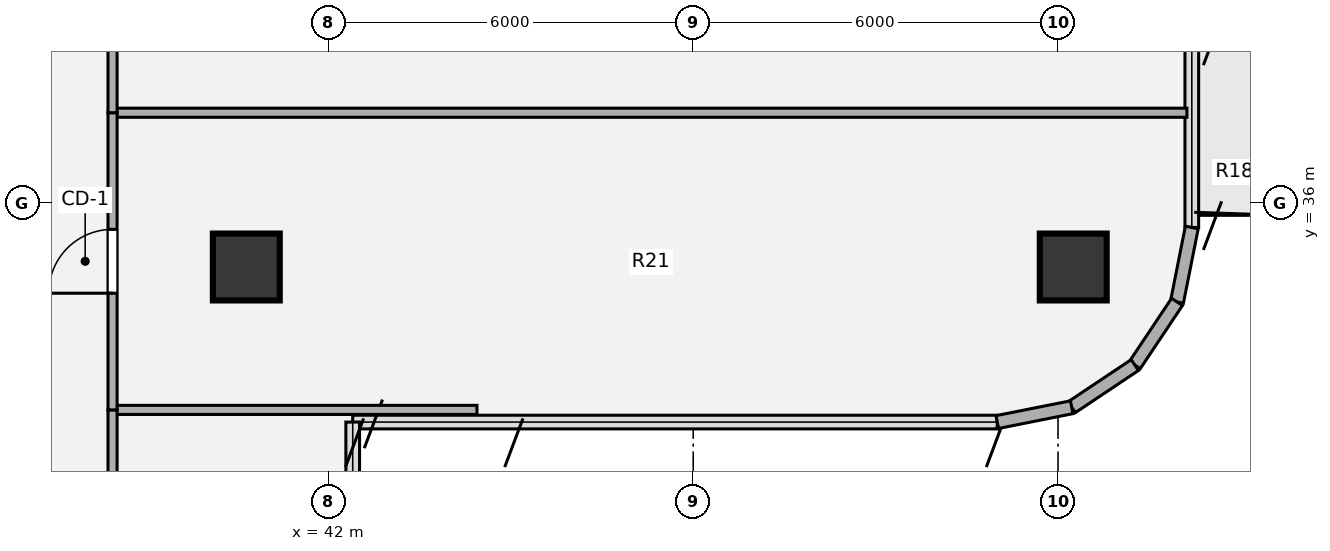
"""IFC4 building model, lengths in metres.
Left out: names, types, materials, properties, quantities, classifications, styles, units other than length and angle.
Written with IfcOpenShell. Run it as: python <this file> out.ifc"""

import sys

from ifc_helpers import new_model, si_unit, direction, frame, frame_2d, origin, origin_2d, place, context, subcontext, project, spatial, rectangle, hollow_circle, extrude, source, transform, mapped, element, fill, save


model = new_model("IFC4")
c1 = context("Model", 3, precision=1e-05, world=origin(), true_north=direction((0.0, 1.0)))
c2 = subcontext(c1, "Body", "Model", "MODEL_VIEW")
j1 = project(units=[si_unit("LENGTHUNIT", "METRE"), si_unit("PLANEANGLEUNIT", "RADIAN")], contexts=[c1])
p1 = place(None, origin())
s1 = spatial("IfcSite", under=j1, at=p1, CompositionType="ELEMENT")
p2 = place(p1, origin())
s2 = spatial("IfcBuilding", under=s1, at=p2, CompositionType="ELEMENT")
p3 = place(p2, frame((0.0, 0.0, 198.0)))
s3 = spatial("IfcBuildingStorey", under=s2, at=p3, CompositionType="ELEMENT", Elevation=198.0)
m1 = source(origin(), c2, "Body", "SweptSolid", [
    extrude(hollow_circle(Radius=0.55, WallThickness=0.04, at=origin_2d()), origin(), (0.0, 0.0, 1.0), 3.78),
])
for number, where, z_axis, x_axis in (
    (1, (54.25, 34.95, 0.0), (0.0, 0.0, 1.0), (1.0, 0.0, 0.0)),
    (2, (40.65, 34.95, 0.0), (0.0, 0.0, 1.0), (1.0, 0.0, 0.0)),
):
    element("IfcColumn", number, at=place(p3, frame(where, z_axis=z_axis, x_axis=x_axis)), inside=s3, PredefinedType="COLUMN", context=c2, shape_type="MappedRepresentation", body=[
        mapped(m1, transform((0.0, 0.0, 0.0), x_axis=(1.0, 0.0, 0.0), y_axis=(0.0, 1.0, 0.0), z_axis=(0.0, 0.0, 1.0), scale=1.0)),
    ])
for number, where, z_axis, x_axis in (
    (3, (56.2, 35.6, 0.0), (0.0, 0.0, 1.0), (-0.195, -0.981, 0.0)),
    (4, (55.956, 34.375, 0.0), (0.0, 0.0, 1.0), (-0.556, -0.831, 0.0)),
    (5, (55.263, 33.337, 0.0), (0.0, 0.0, 1.0), (-0.831, -0.556, 0.0)),
    (6, (54.225, 32.644, 0.0), (0.0, 0.0, 1.0), (-0.981, -0.195, 0.0)),
):
    element("IfcWall", number, at=place(p3, frame(where, z_axis=z_axis, x_axis=x_axis)), inside=s3, PredefinedType="SOLIDWALL", context=c2, shape_type="SweptSolid", body=[
        extrude(rectangle(XDim=1.249, YDim=0.215, at=frame_2d((0.624, 0.0))), origin(), (0.0, 0.0, 1.0), 3.53),
    ])
p4 = place(p3, frame((38.45, 32.6, 0.0), z_axis=(0.0, 0.0, 1.0), x_axis=(1.0, 0.0, 0.0)))
e7 = element("IfcWall", 7, at=p4, inside=s3, PredefinedType="PARTITIONING", context=c2, shape_type="SweptSolid", body=[
    extrude(rectangle(XDim=5.993, YDim=0.15, at=frame_2d((2.997, 0.0))), origin(), (0.0, 0.0, 1.0), 3.5),
])
p5 = place(p3, frame((38.45, 37.487, 0.0), z_axis=(0.0, 0.0, 1.0), x_axis=(1.0, 0.0, 0.0)))
e8 = element("IfcWall", 8, at=p5, inside=s3, PredefinedType="PARTITIONING", context=c2, shape_type="SweptSolid", body=[
    extrude(rectangle(XDim=17.67, YDim=0.15, at=frame_2d((8.835, 0.0))), origin(), (0.0, 0.0, 1.0), 3.055),
])
p6 = place(p3, frame((38.45, 22.4, 0.0), z_axis=(0.0, 0.0, 1.0), x_axis=(0.0, 1.0, 0.0)))
e9 = element("IfcWall", 9, at=p6, inside=s3, PredefinedType="PARTITIONING", context=c2, shape_type="SweptSolid", body=[
    extrude(rectangle(XDim=10.2, YDim=0.15, at=frame_2d((5.1, 0.0))), origin(), (0.0, 0.0, 1.0), 3.5),
])
p7 = place(p6, frame((4.475, 0.0, 0.0)))
e10 = element("IfcOpeningElement", 10, at=p7, cuts=e9, PredefinedType="OPENING", context=c2, shape_type="SweptSolid", body=[
    extrude(rectangle(XDim=1.05, YDim=2.1, at=origin_2d()), frame((0.525, 0.085, 1.05), z_axis=(0.0, -1.0, 0.0), x_axis=(1.0, 0.0, 0.0)), (0.0, 0.0, 1.0), 0.17),
])
p8 = place(p3, frame((38.45, 32.6, 0.0), z_axis=(0.0, 0.0, 1.0), x_axis=(0.0, 1.0, 0.0)))
e11 = element("IfcWall", 11, at=p8, inside=s3, PredefinedType="PARTITIONING", context=c2, shape_type="SweptSolid", body=[
    extrude(rectangle(XDim=4.887, YDim=0.15, at=frame_2d((2.443, 0.0))), origin(), (0.0, 0.0, 1.0), 3.5),
])
p9 = place(p8, frame((1.919, 0.0, 0.0)))
e12 = element("IfcOpeningElement", 12, at=p9, cuts=e11, PredefinedType="OPENING", context=c2, shape_type="SweptSolid", body=[
    extrude(rectangle(XDim=1.05, YDim=2.1, at=origin_2d()), frame((0.525, 0.085, 1.05), z_axis=(0.0, -1.0, 0.0), x_axis=(1.0, 0.0, 0.0)), (0.0, 0.0, 1.0), 0.17),
])
p10 = place(p3, frame((38.45, 37.487, 0.0), z_axis=(0.0, 0.0, 1.0), x_axis=(0.0, 1.0, 0.0)))
e13 = element("IfcWall", 13, at=p10, inside=s3, PredefinedType="PARTITIONING", context=c2, shape_type="SweptSolid", body=[
    extrude(rectangle(XDim=4.706, YDim=0.15, at=frame_2d((2.353, 0.0))), origin(), (0.0, 0.0, 1.0), 3.5),
])
p11 = place(p10, frame((1.828, 0.0, 0.0)))
e14 = element("IfcOpeningElement", 14, at=p11, cuts=e13, PredefinedType="OPENING", context=c2, shape_type="SweptSolid", body=[
    extrude(rectangle(XDim=1.05, YDim=2.1, at=origin_2d()), frame((0.525, 0.085, 1.05), z_axis=(0.0, -1.0, 0.0), x_axis=(1.0, 0.0, 0.0)), (0.0, 0.0, 1.0), 0.17),
])
m2 = source(origin(), c2, "Body", "SweptSolid", [
    extrude(rectangle(XDim=1.05, YDim=2.1, at=origin_2d()), frame((0.525, 0.025, 1.05), z_axis=(0.0, -1.0, 0.0), x_axis=(1.0, 0.0, 0.0)), (0.0, 0.0, 1.0), 0.05),
])
p12 = place(p9, origin())
e15 = element("IfcDoor", 15, at=p12, inside=s3, OperationType="SINGLE_SWING_LEFT", PredefinedType="DOOR", context=c2, shape_type="MappedRepresentation", body=[
    mapped(m2, transform((0.0, 0.0, 0.0), x_axis=(1.0, 0.0, 0.0), y_axis=(0.0, 1.0, 0.0), z_axis=(0.0, 0.0, 1.0), scale=1.0)),
])
fill(e12, e15)
save(model, sys.argv[1])
